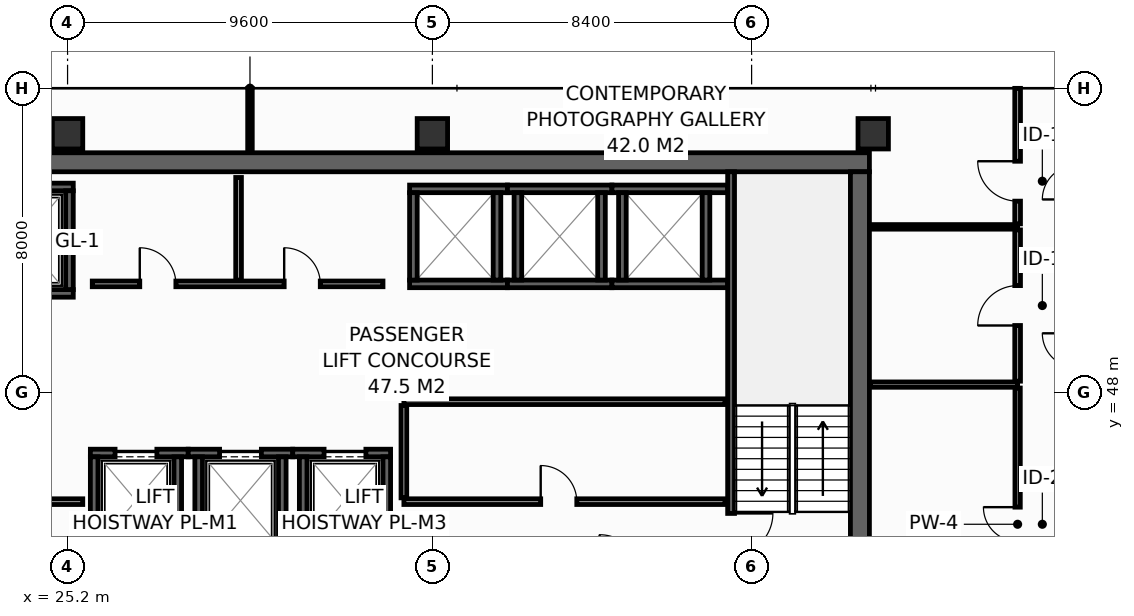
"""IFC4 building model, lengths in metres.
Left out: names, types, materials, properties, quantities, classifications, styles, units other than length and angle.
Written with IfcOpenShell. Run it as: python <this file> out.ifc"""

import sys

from ifc_helpers import new_model, si_unit, direction, frame, frame_2d, origin, origin_2d, place, context, subcontext, project, spatial, rectangle, hollow_rectangle, extrude, element, fill, save


model = new_model("IFC4")
c1 = context("Model", 3, precision=1e-05, world=origin(), true_north=direction((0.0, 1.0)))
c2 = subcontext(c1, "Body", "Model", "MODEL_VIEW")
j1 = project(units=[si_unit("LENGTHUNIT", "METRE"), si_unit("PLANEANGLEUNIT", "RADIAN")], contexts=[c1])
p1 = place(None, origin())
s1 = spatial("IfcSite", under=j1, at=p1, CompositionType="ELEMENT")
p2 = place(p1, origin())
s2 = spatial("IfcBuilding", under=s1, at=p2, CompositionType="ELEMENT")
p3 = place(p2, frame((0.0, 0.0, 209.4)))
s3 = spatial("IfcBuildingStorey", under=s2, at=p3, CompositionType="ELEMENT", Elevation=209.4)
p4 = place(p3, frame((13.6, 54.05, 0.0), z_axis=(0.0, 0.0, 1.0), x_axis=(1.0, 0.0, 0.0)))
e1 = element("IfcWall", 1, at=p4, inside=s3, PredefinedType="SHEAR", context=c2, shape_type="SweptSolid", body=[
    extrude(rectangle(XDim=32.7, YDim=0.5, at=frame_2d((16.35, 0.0))), origin(), (0.0, 0.0, 1.0), 3.55),
])
p5 = place(p3, frame((46.05, 43.4, 0.0), z_axis=(0.0, 0.0, 1.0), x_axis=(0.0, 1.0, 0.0)))
e2 = element("IfcWall", 2, at=p5, inside=s3, PredefinedType="SHEAR", context=c2, shape_type="SweptSolid", body=[
    extrude(rectangle(XDim=10.4, YDim=0.5, at=frame_2d((5.2, 0.0))), origin(), (0.0, 0.0, 1.0), 3.55),
])
for number, where, z_axis, x_axis in (
    (3, (25.2, 54.8, 0.0), (0.0, 0.0, 1.0), (1.0, 0.0, 0.0)),
    (4, (34.8, 54.8, 0.0), (0.0, 0.0, 1.0), (1.0, 0.0, 0.0)),
    (5, (46.4, 54.8, 0.0), (0.0, 0.0, 1.0), (1.0, 0.0, 0.0)),
):
    element("IfcColumn", number, at=place(p3, frame(where, z_axis=z_axis, x_axis=x_axis)), inside=s3, PredefinedType="COLUMN", context=c2, shape_type="SweptSolid", body=[
        extrude(hollow_rectangle(XDim=0.8, YDim=0.8, WallThickness=0.036, at=origin_2d()), origin(), (0.0, 0.0, 1.0), 3.8),
    ])
p6 = place(p3, frame((22.5, 50.6, 0.0), z_axis=(0.0, 0.0, 1.0), x_axis=(1.0, 0.0, 0.0)))
e6 = element("IfcWall", 6, at=p6, inside=s3, PredefinedType="SHEAR", context=c2, shape_type="SweptSolid", body=[
    extrude(rectangle(XDim=2.85, YDim=0.2, at=frame_2d((1.425, 0.0))), origin(), (0.0, 0.0, 1.0), 3.55),
])
p7 = place(p6, frame((0.925, 0.0, 0.0)))
e7 = element("IfcOpeningElement", 7, at=p7, cuts=e6, PredefinedType="OPENING", context=c2, shape_type="SweptSolid", body=[
    extrude(rectangle(XDim=1.25, YDim=2.3, at=frame_2d((0.625, 1.15))), frame((0.0, 0.11, 0.0), z_axis=(0.0, -1.0, 0.0), x_axis=(1.0, 0.0, 0.0)), (0.0, 0.0, 1.0), 0.22),
])
p8 = place(p3, frame((22.5, 53.4, 0.0), z_axis=(0.0, 0.0, 1.0), x_axis=(1.0, 0.0, 0.0)))
e8 = element("IfcWall", 8, at=p8, inside=s3, PredefinedType="SHEAR", context=c2, shape_type="SweptSolid", body=[
    extrude(rectangle(XDim=2.85, YDim=0.2, at=frame_2d((1.425, 0.0))), origin(), (0.0, 0.0, 1.0), 3.55),
])
p9 = place(p3, frame((25.25, 50.7, 0.0), z_axis=(0.0, 0.0, 1.0), x_axis=(0.0, 1.0, 0.0)))
e9 = element("IfcWall", 9, at=p9, inside=s3, PredefinedType="SHEAR", context=c2, shape_type="SweptSolid", body=[
    extrude(rectangle(XDim=2.6, YDim=0.2, at=frame_2d((1.3, 0.0))), origin(), (0.0, 0.0, 1.0), 3.55),
])
p10 = place(p3, frame((25.8, 46.4, 0.0), z_axis=(0.0, 0.0, 1.0), x_axis=(1.0, 0.0, 0.0)))
e10 = element("IfcWall", 10, at=p10, inside=s3, PredefinedType="SHEAR", context=c2, shape_type="SweptSolid", body=[
    extrude(rectangle(XDim=2.575, YDim=0.2, at=frame_2d((1.288, 0.0))), origin(), (0.0, 0.0, 1.0), 3.55),
])
p11 = place(p10, frame((0.65, 0.0, 0.0)))
e11 = element("IfcOpeningElement", 11, at=p11, cuts=e10, PredefinedType="OPENING", context=c2, shape_type="SweptSolid", body=[
    extrude(rectangle(XDim=1.1, YDim=2.2, at=frame_2d((0.55, 1.1))), frame((0.0, 0.11, 0.0), z_axis=(0.0, -1.0, 0.0), x_axis=(1.0, 0.0, 0.0)), (0.0, 0.0, 1.0), 0.22),
])
for number, where, z_axis, x_axis in (
    (12, (25.9, 44.0, 0.0), (0.0, 0.0, 1.0), (0.0, 1.0, 0.0)),
    (13, (28.1, 44.0, 0.0), (0.0, 0.0, 1.0), (0.0, 1.0, 0.0)),
):
    element("IfcWall", number, at=place(p3, frame(where, z_axis=z_axis, x_axis=x_axis)), inside=s3, PredefinedType="SHEAR", context=c2, shape_type="SweptSolid", body=[
        extrude(rectangle(XDim=2.3, YDim=0.2, at=frame_2d((1.15, 0.0))), origin(), (0.0, 0.0, 1.0), 3.55),
    ])
p12 = place(p3, frame((28.375, 46.4, 0.0), z_axis=(0.0, 0.0, 1.0), x_axis=(1.0, 0.0, 0.0)))
e14 = element("IfcWall", 14, at=p12, inside=s3, PredefinedType="SHEAR", context=c2, shape_type="SweptSolid", body=[
    extrude(rectangle(XDim=2.75, YDim=0.2, at=frame_2d((1.375, 0.0))), origin(), (0.0, 0.0, 1.0), 3.55),
])
p13 = place(p12, frame((0.825, 0.0, 0.0)))
e15 = element("IfcOpeningElement", 15, at=p13, cuts=e14, PredefinedType="OPENING", context=c2, shape_type="SweptSolid", body=[
    extrude(rectangle(XDim=1.1, YDim=2.2, at=frame_2d((0.55, 1.1))), frame((0.0, 0.11, 0.0), z_axis=(0.0, -1.0, 0.0), x_axis=(1.0, 0.0, 0.0)), (0.0, 0.0, 1.0), 0.22),
])
for number, where, z_axis, x_axis in (
    (16, (28.65, 44.0, 0.0), (0.0, 0.0, 1.0), (0.0, 1.0, 0.0)),
    (17, (30.85, 44.0, 0.0), (0.0, 0.0, 1.0), (0.0, 1.0, 0.0)),
):
    element("IfcWall", number, at=place(p3, frame(where, z_axis=z_axis, x_axis=x_axis)), inside=s3, PredefinedType="SHEAR", context=c2, shape_type="SweptSolid", body=[
        extrude(rectangle(XDim=2.3, YDim=0.2, at=frame_2d((1.15, 0.0))), origin(), (0.0, 0.0, 1.0), 3.55),
    ])
p14 = place(p3, frame((31.125, 46.4, 0.0), z_axis=(0.0, 0.0, 1.0), x_axis=(1.0, 0.0, 0.0)))
e18 = element("IfcWall", 18, at=p14, inside=s3, PredefinedType="SHEAR", context=c2, shape_type="SweptSolid", body=[
    extrude(rectangle(XDim=2.575, YDim=0.2, at=frame_2d((1.288, 0.0))), origin(), (0.0, 0.0, 1.0), 3.55),
])
p15 = place(p14, frame((0.825, 0.0, 0.0)))
e19 = element("IfcOpeningElement", 19, at=p15, cuts=e18, PredefinedType="OPENING", context=c2, shape_type="SweptSolid", body=[
    extrude(rectangle(XDim=1.1, YDim=2.2, at=frame_2d((0.55, 1.1))), frame((0.0, 0.11, 0.0), z_axis=(0.0, -1.0, 0.0), x_axis=(1.0, 0.0, 0.0)), (0.0, 0.0, 1.0), 0.22),
])
for number, where, z_axis, x_axis in (
    (20, (31.4, 44.0, 0.0), (0.0, 0.0, 1.0), (0.0, 1.0, 0.0)),
    (21, (33.6, 44.0, 0.0), (0.0, 0.0, 1.0), (0.0, 1.0, 0.0)),
):
    element("IfcWall", number, at=place(p3, frame(where, z_axis=z_axis, x_axis=x_axis)), inside=s3, PredefinedType="SHEAR", context=c2, shape_type="SweptSolid", body=[
        extrude(rectangle(XDim=2.3, YDim=0.2, at=frame_2d((1.15, 0.0))), origin(), (0.0, 0.0, 1.0), 3.55),
    ])
for number, where, z_axis, x_axis in (
    (22, (34.2, 50.85, 0.0), (0.0, 0.0, 1.0), (1.0, 0.0, 0.0)),
    (23, (34.2, 53.35, 0.0), (0.0, 0.0, 1.0), (1.0, 0.0, 0.0)),
):
    element("IfcWall", number, at=place(p3, frame(where, z_axis=z_axis, x_axis=x_axis)), inside=s3, PredefinedType="SHEAR", context=c2, shape_type="SweptSolid", body=[
        extrude(rectangle(XDim=2.575, YDim=0.2, at=frame_2d((1.288, 0.0))), origin(), (0.0, 0.0, 1.0), 3.55),
    ])
for number, where, z_axis, x_axis in (
    (24, (34.3, 50.95, 0.0), (0.0, 0.0, 1.0), (0.0, 1.0, 0.0)),
    (25, (36.5, 50.95, 0.0), (0.0, 0.0, 1.0), (0.0, 1.0, 0.0)),
):
    element("IfcWall", number, at=place(p3, frame(where, z_axis=z_axis, x_axis=x_axis)), inside=s3, PredefinedType="SHEAR", context=c2, shape_type="SweptSolid", body=[
        extrude(rectangle(XDim=2.3, YDim=0.2, at=frame_2d((1.15, 0.0))), origin(), (0.0, 0.0, 1.0), 3.55),
    ])
for number, where, z_axis, x_axis in (
    (26, (36.775, 50.85, 0.0), (0.0, 0.0, 1.0), (1.0, 0.0, 0.0)),
    (27, (36.775, 53.35, 0.0), (0.0, 0.0, 1.0), (1.0, 0.0, 0.0)),
):
    element("IfcWall", number, at=place(p3, frame(where, z_axis=z_axis, x_axis=x_axis)), inside=s3, PredefinedType="SHEAR", context=c2, shape_type="SweptSolid", body=[
        extrude(rectangle(XDim=2.75, YDim=0.2, at=frame_2d((1.375, 0.0))), origin(), (0.0, 0.0, 1.0), 3.55),
    ])
for number, where, z_axis, x_axis in (
    (28, (37.05, 50.95, 0.0), (0.0, 0.0, 1.0), (0.0, 1.0, 0.0)),
    (29, (39.25, 50.95, 0.0), (0.0, 0.0, 1.0), (0.0, 1.0, 0.0)),
):
    element("IfcWall", number, at=place(p3, frame(where, z_axis=z_axis, x_axis=x_axis)), inside=s3, PredefinedType="SHEAR", context=c2, shape_type="SweptSolid", body=[
        extrude(rectangle(XDim=2.3, YDim=0.2, at=frame_2d((1.15, 0.0))), origin(), (0.0, 0.0, 1.0), 3.55),
    ])
for number, where, z_axis, x_axis in (
    (30, (39.525, 50.85, 0.0), (0.0, 0.0, 1.0), (1.0, 0.0, 0.0)),
    (31, (39.525, 53.35, 0.0), (0.0, 0.0, 1.0), (1.0, 0.0, 0.0)),
):
    element("IfcWall", number, at=place(p3, frame(where, z_axis=z_axis, x_axis=x_axis)), inside=s3, PredefinedType="SHEAR", context=c2, shape_type="SweptSolid", body=[
        extrude(rectangle(XDim=3.045, YDim=0.2, at=frame_2d((1.522, 0.0))), origin(), (0.0, 0.0, 1.0), 3.55),
    ])
for number, where, z_axis, x_axis in (
    (32, (39.8, 50.95, 0.0), (0.0, 0.0, 1.0), (0.0, 1.0, 0.0)),
    (33, (42.0, 50.95, 0.0), (0.0, 0.0, 1.0), (0.0, 1.0, 0.0)),
):
    element("IfcWall", number, at=place(p3, frame(where, z_axis=z_axis, x_axis=x_axis)), inside=s3, PredefinedType="SHEAR", context=c2, shape_type="SweptSolid", body=[
        extrude(rectangle(XDim=2.3, YDim=0.2, at=frame_2d((1.15, 0.0))), origin(), (0.0, 0.0, 1.0), 3.55),
    ])
p16 = place(p3, frame((42.66, 53.8, 0.0), z_axis=(0.0, 0.0, 1.0), x_axis=(0.0, -1.0, 0.0)))
e34 = element("IfcWall", 34, at=p16, inside=s3, PredefinedType="SHEAR", context=c2, shape_type="SweptSolid", body=[
    extrude(rectangle(XDim=10.4, YDim=0.18, at=frame_2d((5.2, 0.0))), origin(), (0.0, 0.0, 1.0), 3.55),
])
p17 = place(p16, frame((8.99, 0.0, 0.0)))
e35 = element("IfcOpeningElement", 35, at=p17, cuts=e34, PredefinedType="OPENING", context=c2, shape_type="SweptSolid", body=[
    extrude(rectangle(XDim=1.1, YDim=2.15, at=frame_2d((0.55, 1.075))), frame((0.0, 0.1, 0.0), z_axis=(0.0, -1.0, 0.0), x_axis=(1.0, 0.0, 0.0)), (0.0, 0.0, 1.0), 0.2),
])
p18 = place(p3, frame((22.68, 45.12, 0.0), z_axis=(0.0, 0.0, 1.0), x_axis=(1.0, 0.0, 0.0)))
e36 = element("IfcWall", 36, at=p18, inside=s3, PredefinedType="PARTITIONING", context=c2, shape_type="SweptSolid", body=[
    extrude(rectangle(XDim=2.92, YDim=0.15, at=frame_2d((1.46, 0.0))), origin(), (0.0, 0.0, 1.0), 3.55),
])
p19 = place(p18, frame((0.85, 0.0, 0.0)))
e37 = element("IfcOpeningElement", 37, at=p19, cuts=e36, PredefinedType="OPENING", context=c2, shape_type="SweptSolid", body=[
    extrude(rectangle(XDim=1.1, YDim=2.15, at=frame_2d((0.55, 1.075))), frame((0.0, 0.085, 0.0), z_axis=(0.0, -1.0, 0.0), x_axis=(1.0, 0.0, 0.0)), (0.0, 0.0, 1.0), 0.17),
])
p20 = place(p3, frame((34.05, 45.12, 0.0), z_axis=(0.0, 0.0, 1.0), x_axis=(1.0, 0.0, 0.0)))
e38 = element("IfcWall", 38, at=p20, inside=s3, PredefinedType="PARTITIONING", context=c2, shape_type="SweptSolid", body=[
    extrude(rectangle(XDim=8.45, YDim=0.15, at=frame_2d((4.225, 0.0))), origin(), (0.0, 0.0, 1.0), 3.55),
])
p21 = place(p20, frame((3.6, 0.0, 0.0)))
e39 = element("IfcOpeningElement", 39, at=p21, cuts=e38, PredefinedType="OPENING", context=c2, shape_type="SweptSolid", body=[
    extrude(rectangle(XDim=0.95, YDim=2.15, at=frame_2d((0.475, 1.075))), frame((0.0, 0.085, 0.0), z_axis=(0.0, -1.0, 0.0), x_axis=(1.0, 0.0, 0.0)), (0.0, 0.0, 1.0), 0.17),
])
p22 = place(p3, frame((34.05, 47.75, 0.0), z_axis=(0.0, 0.0, 1.0), x_axis=(1.0, 0.0, 0.0)))
e40 = element("IfcWall", 40, at=p22, inside=s3, PredefinedType="PARTITIONING", context=c2, shape_type="SweptSolid", body=[
    extrude(rectangle(XDim=8.45, YDim=0.15, at=frame_2d((4.225, 0.0))), origin(), (0.0, 0.0, 1.0), 3.55),
])
p23 = place(p3, frame((34.05, 45.22, 0.0), z_axis=(0.0, 0.0, 1.0), x_axis=(0.0, 1.0, 0.0)))
e41 = element("IfcWall", 41, at=p23, inside=s3, PredefinedType="PARTITIONING", context=c2, shape_type="SweptSolid", body=[
    extrude(rectangle(XDim=2.43, YDim=0.15, at=frame_2d((1.215, 0.0))), origin(), (0.0, 0.0, 1.0), 3.55),
])
p24 = place(p3, frame((25.85, 50.85, 0.0), z_axis=(0.0, 0.0, 1.0), x_axis=(1.0, 0.0, 0.0)))
e42 = element("IfcWall", 42, at=p24, inside=s3, PredefinedType="PARTITIONING", context=c2, shape_type="SweptSolid", body=[
    extrude(rectangle(XDim=7.65, YDim=0.15, at=frame_2d((3.825, 0.0))), origin(), (0.0, 0.0, 1.0), 3.55),
])
p25 = place(p24, frame((1.25, 0.0, 0.0)))
e43 = element("IfcOpeningElement", 43, at=p25, cuts=e42, PredefinedType="OPENING", context=c2, shape_type="SweptSolid", body=[
    extrude(rectangle(XDim=0.95, YDim=2.15, at=frame_2d((0.475, 1.075))), frame((0.0, 0.085, 0.0), z_axis=(0.0, -1.0, 0.0), x_axis=(1.0, 0.0, 0.0)), (0.0, 0.0, 1.0), 0.17),
])
p26 = place(p24, frame((5.05, 0.0, 0.0)))
e44 = element("IfcOpeningElement", 44, at=p26, cuts=e42, PredefinedType="OPENING", context=c2, shape_type="SweptSolid", body=[
    extrude(rectangle(XDim=0.95, YDim=2.15, at=frame_2d((0.475, 1.075))), frame((0.0, 0.085, 0.0), z_axis=(0.0, -1.0, 0.0), x_axis=(1.0, 0.0, 0.0)), (0.0, 0.0, 1.0), 0.17),
])
p27 = place(p3, frame((29.7, 50.95, 0.0), z_axis=(0.0, 0.0, 1.0), x_axis=(0.0, 1.0, 0.0)))
e45 = element("IfcWall", 45, at=p27, inside=s3, PredefinedType="PARTITIONING", context=c2, shape_type="SweptSolid", body=[
    extrude(rectangle(XDim=2.7, YDim=0.15, at=frame_2d((1.35, 0.0))), origin(), (0.0, 0.0, 1.0), 3.55),
])
p28 = place(p3, frame((46.32, 48.2, 0.0), z_axis=(0.0, 0.0, 1.0), x_axis=(1.0, 0.0, 0.0)))
e46 = element("IfcWall", 46, at=p28, inside=s3, PredefinedType="PARTITIONING", context=c2, shape_type="SweptSolid", body=[
    extrude(rectangle(XDim=3.88, YDim=0.14, at=frame_2d((1.94, 0.0))), origin(), (0.0, 0.0, 1.0), 3.55),
])
p29 = place(p3, frame((50.2, 40.94, 0.0), z_axis=(0.0, 0.0, 1.0), x_axis=(0.0, 1.0, 0.0)))
e47 = element("IfcWall", 47, at=p29, inside=s3, PredefinedType="PARTITIONING", context=c2, shape_type="SweptSolid", body=[
    extrude(rectangle(XDim=7.17, YDim=0.14, at=frame_2d((3.585, 0.0))), origin(), (0.0, 0.0, 1.0), 2.835),
])
p30 = place(p29, frame((3.135, 0.0, 0.0)))
e48 = element("IfcOpeningElement", 48, at=p30, cuts=e47, PredefinedType="OPENING", context=c2, shape_type="SweptSolid", body=[
    extrude(rectangle(XDim=0.9, YDim=2.1, at=frame_2d((0.45, 1.05))), frame((0.0, 0.08, 0.0), z_axis=(0.0, -1.0, 0.0), x_axis=(1.0, 0.0, 0.0)), (0.0, 0.0, 1.0), 0.16),
])
p31 = place(p3, frame((46.32, 52.35, 0.0), z_axis=(0.0, 0.0, 1.0), x_axis=(1.0, 0.0, 0.0)))
e49 = element("IfcWall", 49, at=p31, inside=s3, PredefinedType="PARTITIONING", context=c2, shape_type="SweptSolid", body=[
    extrude(rectangle(XDim=3.88, YDim=0.12, at=frame_2d((1.94, 0.0))), origin(), (0.0, 0.0, 1.0), 3.55),
])
p32 = place(p3, frame((30.0, 54.32, 0.0), z_axis=(0.0, 0.0, 1.0), x_axis=(0.0, 1.0, 0.0)))
e50 = element("IfcWall", 50, at=p32, inside=s3, PredefinedType="PARTITIONING", context=c2, shape_type="SweptSolid", body=[
    extrude(rectangle(XDim=1.675, YDim=0.12, at=frame_2d((0.837, 0.0))), origin(), (0.0, 0.0, 1.0), 2.935),
])
p33 = place(p3, frame((50.2, 48.29, 0.0), z_axis=(0.0, 0.0, 1.0), x_axis=(0.0, 1.0, 0.0)))
e51 = element("IfcWall", 51, at=p33, inside=s3, PredefinedType="PARTITIONING", context=c2, shape_type="SweptSolid", body=[
    extrude(rectangle(XDim=3.98, YDim=0.15, at=frame_2d((1.99, 0.0))), origin(), (0.0, 0.0, 1.0), 3.55),
])
p34 = place(p33, frame((1.465, 0.0, 0.0)))
e52 = element("IfcOpeningElement", 52, at=p34, cuts=e51, PredefinedType="OPENING", context=c2, shape_type="SweptSolid", body=[
    extrude(rectangle(XDim=1.05, YDim=2.15, at=frame_2d((0.525, 1.075))), frame((0.0, 0.085, 0.0), z_axis=(0.0, -1.0, 0.0), x_axis=(1.0, 0.0, 0.0)), (0.0, 0.0, 1.0), 0.17),
])
p35 = place(p3, frame((50.2, 52.43, 0.0), z_axis=(0.0, 0.0, 1.0), x_axis=(0.0, 1.0, 0.0)))
e53 = element("IfcWall", 53, at=p35, inside=s3, PredefinedType="PARTITIONING", context=c2, shape_type="SweptSolid", body=[
    extrude(rectangle(XDim=3.565, YDim=0.15, at=frame_2d((1.783, 0.0))), origin(), (0.0, 0.0, 1.0), 2.935),
])
p36 = place(p35, frame((0.597, 0.0, 0.0)))
e54 = element("IfcOpeningElement", 54, at=p36, cuts=e53, PredefinedType="OPENING", context=c2, shape_type="SweptSolid", body=[
    extrude(rectangle(XDim=1.05, YDim=2.15, at=frame_2d((0.525, 1.075))), frame((0.0, 0.085, 0.0), z_axis=(0.0, -1.0, 0.0), x_axis=(1.0, 0.0, 0.0)), (0.0, 0.0, 1.0), 0.17),
])
p37 = place(p11, origin())
e55 = element("IfcDoor", 55, at=p37, inside=s3, OperationType="SLIDING_TO_LEFT", PredefinedType="DOOR", context=c2, shape_type="SweptSolid", body=[
    extrude(rectangle(XDim=1.1, YDim=2.2, at=frame_2d((0.55, 1.1))), frame((0.0, 0.025, 0.0), z_axis=(0.0, -1.0, 0.0), x_axis=(1.0, 0.0, 0.0)), (0.0, 0.0, 1.0), 0.05),
])
fill(e11, e55)
p38 = place(p13, origin())
e56 = element("IfcDoor", 56, at=p38, inside=s3, OperationType="SLIDING_TO_LEFT", PredefinedType="DOOR", context=c2, shape_type="SweptSolid", body=[
    extrude(rectangle(XDim=1.1, YDim=2.2, at=frame_2d((0.55, 1.1))), frame((0.0, 0.025, 0.0), z_axis=(0.0, -1.0, 0.0), x_axis=(1.0, 0.0, 0.0)), (0.0, 0.0, 1.0), 0.05),
])
fill(e15, e56)
p39 = place(p15, origin())
e57 = element("IfcDoor", 57, at=p39, inside=s3, OperationType="SLIDING_TO_LEFT", PredefinedType="DOOR", context=c2, shape_type="SweptSolid", body=[
    extrude(rectangle(XDim=1.1, YDim=2.2, at=frame_2d((0.55, 1.1))), frame((0.0, 0.025, 0.0), z_axis=(0.0, -1.0, 0.0), x_axis=(1.0, 0.0, 0.0)), (0.0, 0.0, 1.0), 0.05),
])
fill(e19, e57)
p40 = place(p17, origin())
e58 = element("IfcDoor", 58, at=p40, inside=s3, OperationType="SINGLE_SWING_LEFT", PredefinedType="DOOR", context=c2, shape_type="SweptSolid", body=[
    extrude(rectangle(XDim=1.1, YDim=2.15, at=frame_2d((0.55, 1.075))), frame((0.0, 0.025, 0.0), z_axis=(0.0, -1.0, 0.0), x_axis=(1.0, 0.0, 0.0)), (0.0, 0.0, 1.0), 0.05),
])
fill(e35, e58)
p41 = place(p21, origin())
e59 = element("IfcDoor", 59, at=p41, inside=s3, OperationType="SINGLE_SWING_LEFT", PredefinedType="DOOR", context=c2, shape_type="SweptSolid", body=[
    extrude(rectangle(XDim=0.95, YDim=2.15, at=frame_2d((0.475, 1.075))), frame((0.0, 0.025, 0.0), z_axis=(0.0, -1.0, 0.0), x_axis=(1.0, 0.0, 0.0)), (0.0, 0.0, 1.0), 0.05),
])
fill(e39, e59)
p42 = place(p25, origin())
e60 = element("IfcDoor", 60, at=p42, inside=s3, OperationType="SINGLE_SWING_LEFT", PredefinedType="DOOR", context=c2, shape_type="SweptSolid", body=[
    extrude(rectangle(XDim=0.95, YDim=2.15, at=frame_2d((0.475, 1.075))), frame((0.0, 0.025, 0.0), z_axis=(0.0, -1.0, 0.0), x_axis=(1.0, 0.0, 0.0)), (0.0, 0.0, 1.0), 0.05),
])
fill(e43, e60)
p43 = place(p26, origin())
e61 = element("IfcDoor", 61, at=p43, inside=s3, OperationType="SINGLE_SWING_LEFT", PredefinedType="DOOR", context=c2, shape_type="SweptSolid", body=[
    extrude(rectangle(XDim=0.95, YDim=2.15, at=frame_2d((0.475, 1.075))), frame((0.0, 0.025, 0.0), z_axis=(0.0, -1.0, 0.0), x_axis=(1.0, 0.0, 0.0)), (0.0, 0.0, 1.0), 0.05),
])
fill(e44, e61)
p44 = place(p30, origin())
e62 = element("IfcDoor", 62, at=p44, inside=s3, OperationType="SINGLE_SWING_RIGHT", PredefinedType="DOOR", context=c2, shape_type="SweptSolid", body=[
    extrude(rectangle(XDim=0.9, YDim=2.1, at=frame_2d((0.45, 1.05))), frame((0.0, 0.025, 0.0), z_axis=(0.0, -1.0, 0.0), x_axis=(1.0, 0.0, 0.0)), (0.0, 0.0, 1.0), 0.05),
])
fill(e48, e62)
p45 = place(p34, origin())
e63 = element("IfcDoor", 63, at=p45, inside=s3, OperationType="SINGLE_SWING_LEFT", PredefinedType="DOOR", context=c2, shape_type="SweptSolid", body=[
    extrude(rectangle(XDim=1.05, YDim=2.15, at=frame_2d((0.525, 1.075))), frame((0.0, 0.025, 0.0), z_axis=(0.0, -1.0, 0.0), x_axis=(1.0, 0.0, 0.0)), (0.0, 0.0, 1.0), 0.05),
])
fill(e52, e63)
p46 = place(p36, origin())
e64 = element("IfcDoor", 64, at=p46, inside=s3, OperationType="SINGLE_SWING_RIGHT", PredefinedType="DOOR", context=c2, shape_type="SweptSolid", body=[
    extrude(rectangle(XDim=1.05, YDim=2.15, at=frame_2d((0.525, 1.075))), frame((0.0, 0.025, 0.0), z_axis=(0.0, -1.0, 0.0), x_axis=(1.0, 0.0, 0.0)), (0.0, 0.0, 1.0), 0.05),
])
fill(e54, e64)
save(model, sys.argv[1])
